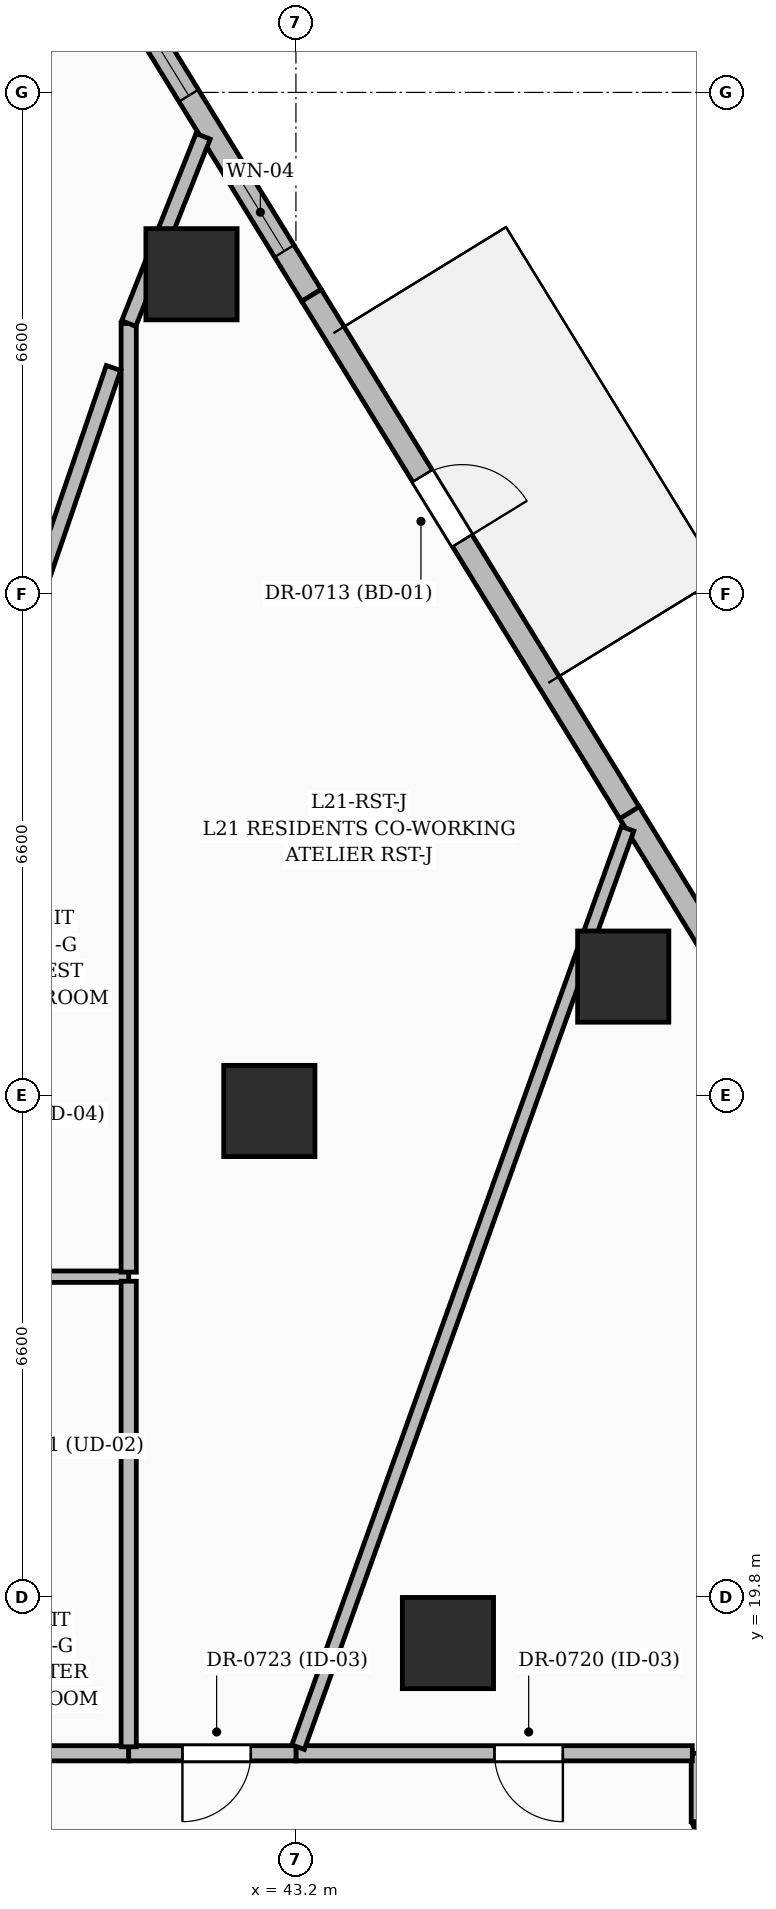
"""IFC4 building model, lengths in metres.
Left out: names, types, materials, properties, quantities, classifications, styles, units other than length and angle.
Written with IfcOpenShell. Run it as: python <this file> out.ifc"""

import sys

from ifc_helpers import new_model, si_unit, direction, frame, frame_2d, origin, origin_2d, place, context, subcontext, project, spatial, rectangle, extrude, element, fill, save


model = new_model("IFC4")
c1 = context("Model", 3, precision=1e-05, world=origin(), true_north=direction((0.0, 1.0)))
c2 = subcontext(c1, "Body", "Model", "MODEL_VIEW")
j1 = project(units=[si_unit("LENGTHUNIT", "METRE"), si_unit("PLANEANGLEUNIT", "RADIAN")], contexts=[c1])
p1 = place(None, origin())
s1 = spatial("IfcSite", under=j1, at=p1, CompositionType="ELEMENT")
p2 = place(p1, origin())
s2 = spatial("IfcBuilding", under=s1, at=p2, CompositionType="ELEMENT")
p3 = place(p2, frame((0.0, 0.0, 85.8)))
s3 = spatial("IfcBuildingStorey", under=s2, at=p3, CompositionType="ELEMENT", Elevation=85.8)
for number, where, z_axis, x_axis in (
    (1, (45.2, 19.2, 0.0), (0.0, 0.0, 1.0), (1.0, 0.0, 0.0)),
    (2, (42.85, 26.2, 0.0), (0.0, 0.0, 1.0), (1.0, 0.0, 0.0)),
    (3, (47.506, 27.968, 0.0), (0.0, 0.0, 1.0), (1.0, 0.0, 0.0)),
    (4, (41.826, 37.208, 0.0), (0.0, 0.0, 1.0), (1.0, 0.0, 0.0)),
):
    element("IfcColumn", number, at=place(p3, frame(where, z_axis=z_axis, x_axis=x_axis)), inside=s3, PredefinedType="COLUMN", context=c2, shape_type="SweptSolid", body=[
        extrude(rectangle(XDim=1.2, YDim=1.2, at=origin_2d()), origin(), (0.0, 0.0, 1.0), 3.6),
    ])
p4 = place(p3, frame((39.546, 43.208, 0.0), z_axis=(0.0, 0.0, 1.0), x_axis=(0.523664809677, -0.851924390487, 0.0)))
e5 = element("IfcWall", 5, at=p4, inside=s3, PredefinedType="SOLIDWALL", context=c2, shape_type="SweptSolid", body=[
    extrude(rectangle(XDim=7.369, YDim=0.3, at=frame_2d((3.685, 0.0))), origin(), (0.0, 0.0, 1.0), 3.35),
])
p5 = place(p4, frame((5.485, 0.0, 0.8)))
e6 = element("IfcOpeningElement", 6, at=p5, cuts=e5, PredefinedType="OPENING", context=c2, shape_type="SweptSolid", body=[
    extrude(rectangle(XDim=1.2, YDim=1.8, at=frame_2d((0.6, 0.9))), frame((0.0, 0.16, 0.0), z_axis=(0.0, -1.0, 0.0), x_axis=(1.0, 0.0, 0.0)), (0.0, 0.0, 1.0), 0.32),
])
p6 = place(p4, frame((1.885, 0.0, 0.6)))
e7 = element("IfcOpeningElement", 7, at=p6, cuts=e5, PredefinedType="OPENING", context=c2, shape_type="SweptSolid", body=[
    extrude(rectangle(XDim=2.4, YDim=2.1, at=frame_2d((1.2, 1.05))), frame((0.0, 0.16, 0.0), z_axis=(0.0, -1.0, 0.0), x_axis=(1.0, 0.0, 0.0)), (0.0, 0.0, 1.0), 0.32),
])
p7 = place(p3, frame((43.405, 36.93, 0.0), z_axis=(0.0, 0.0, 1.0), x_axis=(0.523667141988, -0.851922956847, 0.0)))
e8 = element("IfcWall", 8, at=p7, inside=s3, PredefinedType="SOLIDWALL", context=c2, shape_type="SweptSolid", body=[
    extrude(rectangle(XDim=8.042, YDim=0.3, at=frame_2d((4.021, 0.0))), origin(), (0.0, 0.0, 1.0), 3.35),
])
p8 = place(p7, frame((2.787, 0.0, 0.0)))
e9 = element("IfcOpeningElement", 9, at=p8, cuts=e8, PredefinedType="OPENING", context=c2, shape_type="SweptSolid", body=[
    extrude(rectangle(XDim=1.0, YDim=2.2, at=frame_2d((0.5, 1.1))), frame((0.0, 0.16, 0.0), z_axis=(0.0, -1.0, 0.0), x_axis=(1.0, 0.0, 0.0)), (0.0, 0.0, 1.0), 0.32),
])
p9 = place(p3, frame((47.588, 30.124, 0.0), z_axis=(0.0, 0.0, 1.0), x_axis=(0.523684181041, -0.851912482904, 0.0)))
e10 = element("IfcWall", 10, at=p9, inside=s3, PredefinedType="SOLIDWALL", context=c2, shape_type="SweptSolid", body=[
    extrude(rectangle(XDim=7.879, YDim=0.3, at=frame_2d((3.939, 0.0))), origin(), (0.0, 0.0, 1.0), 3.35),
])
p10 = place(p9, frame((3.07, 0.0, 0.6)))
e11 = element("IfcOpeningElement", 11, at=p10, cuts=e10, PredefinedType="OPENING", context=c2, shape_type="SweptSolid", body=[
    extrude(rectangle(XDim=1.8, YDim=2.1, at=frame_2d((0.9, 1.05))), frame((0.0, 0.16, 0.0), z_axis=(0.0, -1.0, 0.0), x_axis=(1.0, 0.0, 0.0)), (0.0, 0.0, 1.0), 0.32),
])
p11 = place(p3, frame((48.5, 16.85, 0.0), z_axis=(0.0, 0.0, 1.0), x_axis=(0.0, 1.0, 0.0)))
e12 = element("IfcWall", 12, at=p11, inside=s3, PredefinedType="PARTITIONING", context=c2, shape_type="SweptSolid", body=[
    extrude(rectangle(XDim=0.9, YDim=0.2, at=frame_2d((0.45, 0.0))), origin(), (0.0, 0.0, 1.0), 3.35),
])
p12 = place(p3, frame((48.415, 17.75, 0.0), z_axis=(0.0, 0.0, 1.0), x_axis=(-1.0, 0.0, 0.0)))
e13 = element("IfcWall", 13, at=p12, inside=s3, PredefinedType="PARTITIONING", context=c2, shape_type="SweptSolid", body=[
    extrude(rectangle(XDim=5.215, YDim=0.2, at=frame_2d((2.607, 0.0))), origin(), (0.0, 0.0, 1.0), 2.309),
])
p13 = place(p12, frame((1.703, 0.0, 0.0)))
e14 = element("IfcOpeningElement", 14, at=p13, cuts=e13, PredefinedType="OPENING", context=c2, shape_type="SweptSolid", body=[
    extrude(rectangle(XDim=0.9, YDim=2.1, at=frame_2d((0.45, 1.05))), frame((0.0, 0.11, 0.0), z_axis=(0.0, -1.0, 0.0), x_axis=(1.0, 0.0, 0.0)), (0.0, 0.0, 1.0), 0.22),
])
p14 = place(p3, frame((41.0, 17.75, 0.0), z_axis=(0.0, 0.0, 1.0), x_axis=(-1.0, 0.0, 0.0)))
e15 = element("IfcWall", 15, at=p14, inside=s3, PredefinedType="PARTITIONING", context=c2, shape_type="SweptSolid", body=[
    extrude(rectangle(XDim=2.14, YDim=0.2, at=frame_2d((1.07, 0.0))), origin(), (0.0, 0.0, 1.0), 3.35),
])
p15 = place(p3, frame((43.2, 17.75, 0.0), z_axis=(0.0, 0.0, 1.0), x_axis=(-1.0, 0.0, 0.0)))
e16 = element("IfcWall", 16, at=p15, inside=s3, PredefinedType="PARTITIONING", context=c2, shape_type="SweptSolid", body=[
    extrude(rectangle(XDim=2.2, YDim=0.2, at=frame_2d((1.1, 0.0))), origin(), (0.0, 0.0, 1.0), 3.35),
])
p16 = place(p15, frame((0.593, 0.0, 0.0)))
e17 = element("IfcOpeningElement", 17, at=p16, cuts=e16, PredefinedType="OPENING", context=c2, shape_type="SweptSolid", body=[
    extrude(rectangle(XDim=0.9, YDim=2.1, at=frame_2d((0.45, 1.05))), frame((0.0, 0.11, 0.0), z_axis=(0.0, -1.0, 0.0), x_axis=(1.0, 0.0, 0.0)), (0.0, 0.0, 1.0), 0.22),
])
p17 = place(p3, frame((54.639, 1.905, 0.0), z_axis=(0.0, 0.0, 1.0), x_axis=(-0.379959258836, 0.925003222494, 0.0)))
e18 = element("IfcWall", 18, at=p17, inside=s3, PredefinedType="PARTITIONING", context=c2, shape_type="SweptSolid", body=[
    extrude(rectangle(XDim=16.157, YDim=0.175, at=frame_2d((8.078, 0.0))), origin(), (0.0, 0.0, 1.0), 2.345),
])
p18 = place(p3, frame((47.563, 29.913, 0.0), z_axis=(0.0, 0.0, 1.0), x_axis=(-0.337656526374, -0.941269392999, 0.0)))
e19 = element("IfcWall", 19, at=p18, inside=s3, PredefinedType="PARTITIONING", context=c2, shape_type="SweptSolid", body=[
    extrude(rectangle(XDim=12.837, YDim=0.175, at=frame_2d((6.418, 0.0))), origin(), (0.0, 0.0, 1.0), 2.309),
])
p19 = place(p3, frame((38.873, 24.02, 0.0), z_axis=(0.0, 0.0, 1.0), x_axis=(1.0, 0.0, 0.0)))
e20 = element("IfcWall", 20, at=p19, inside=s3, PredefinedType="PARTITIONING", context=c2, shape_type="SweptSolid", body=[
    extrude(rectangle(XDim=2.127, YDim=0.15, at=frame_2d((1.064, 0.0))), origin(), (0.0, 0.0, 1.0), 3.35),
])
p20 = place(p3, frame((41.0, 24.08, 0.0), z_axis=(0.0, 0.0, 1.0), x_axis=(0.0, 1.0, 0.0)))
e21 = element("IfcWall", 21, at=p20, inside=s3, PredefinedType="PARTITIONING", context=c2, shape_type="SweptSolid", body=[
    extrude(rectangle(XDim=12.48, YDim=0.2, at=frame_2d((6.24, 0.0))), origin(), (0.0, 0.0, 1.0), 2.309),
])
p21 = place(p3, frame((40.8, 35.975, 0.0), z_axis=(0.0, 0.0, 1.0), x_axis=(-0.32346038507, -0.946241712931, 0.0)))
e22 = element("IfcWall", 22, at=p21, inside=s3, PredefinedType="PARTITIONING", context=c2, shape_type="SweptSolid", body=[
    extrude(rectangle(XDim=5.998, YDim=0.2, at=frame_2d((2.999, 0.0))), origin(), (0.0, 0.0, 1.0), 2.712),
])
p22 = place(p3, frame((41.0, 17.835, 0.0), z_axis=(0.0, 0.0, 1.0), x_axis=(0.0, 1.0, 0.0)))
e23 = element("IfcWall", 23, at=p22, inside=s3, PredefinedType="PARTITIONING", context=c2, shape_type="SweptSolid", body=[
    extrude(rectangle(XDim=6.125, YDim=0.2, at=frame_2d((3.062, 0.0))), origin(), (0.0, 0.0, 1.0), 2.853),
])
p23 = place(p3, frame((41.979, 39.023, 0.0), z_axis=(0.0, 0.0, 1.0), x_axis=(-0.369388654108, -0.929274998166, 0.0)))
e24 = element("IfcWall", 24, at=p23, inside=s3, PredefinedType="PARTITIONING", context=c2, shape_type="SweptSolid", body=[
    extrude(rectangle(XDim=2.65, YDim=0.2, at=frame_2d((1.325, 0.0))), origin(), (0.0, 0.0, 1.0), 2.37),
])
p24 = place(p5, origin())
e25 = element("IfcWindow", 25, at=p24, inside=s3, PartitioningType="SINGLE_PANEL", PredefinedType="WINDOW", context=c2, shape_type="SweptSolid", body=[
    extrude(rectangle(XDim=1.2, YDim=1.8, at=frame_2d((0.6, 0.9))), frame((0.0, 0.03, 0.0), z_axis=(0.0, -1.0, 0.0), x_axis=(1.0, 0.0, 0.0)), (0.0, 0.0, 1.0), 0.06),
])
fill(e6, e25)
p25 = place(p6, origin())
e26 = element("IfcWindow", 26, at=p25, inside=s3, PartitioningType="SINGLE_PANEL", PredefinedType="WINDOW", context=c2, shape_type="SweptSolid", body=[
    extrude(rectangle(XDim=2.4, YDim=2.1, at=frame_2d((1.2, 1.05))), frame((0.0, 0.03, 0.0), z_axis=(0.0, -1.0, 0.0), x_axis=(1.0, 0.0, 0.0)), (0.0, 0.0, 1.0), 0.06),
])
fill(e7, e26)
p26 = place(p8, origin())
e27 = element("IfcDoor", 27, at=p26, inside=s3, OperationType="SINGLE_SWING_RIGHT", PredefinedType="DOOR", context=c2, shape_type="SweptSolid", body=[
    extrude(rectangle(XDim=1.0, YDim=2.2, at=frame_2d((0.5, 1.1))), frame((0.0, 0.025, 0.0), z_axis=(0.0, -1.0, 0.0), x_axis=(1.0, 0.0, 0.0)), (0.0, 0.0, 1.0), 0.05),
])
fill(e9, e27)
p27 = place(p13, origin())
e28 = element("IfcDoor", 28, at=p27, inside=s3, OperationType="SINGLE_SWING_LEFT", PredefinedType="DOOR", context=c2, shape_type="SweptSolid", body=[
    extrude(rectangle(XDim=0.9, YDim=2.1, at=frame_2d((0.45, 1.05))), frame((0.0, 0.025, 0.0), z_axis=(0.0, -1.0, 0.0), x_axis=(1.0, 0.0, 0.0)), (0.0, 0.0, 1.0), 0.05),
])
fill(e14, e28)
p28 = place(p16, origin())
e29 = element("IfcDoor", 29, at=p28, inside=s3, OperationType="SINGLE_SWING_RIGHT", PredefinedType="DOOR", context=c2, shape_type="SweptSolid", body=[
    extrude(rectangle(XDim=0.9, YDim=2.1, at=frame_2d((0.45, 1.05))), frame((0.0, 0.025, 0.0), z_axis=(0.0, -1.0, 0.0), x_axis=(1.0, 0.0, 0.0)), (0.0, 0.0, 1.0), 0.05),
])
fill(e17, e29)
save(model, sys.argv[1])
